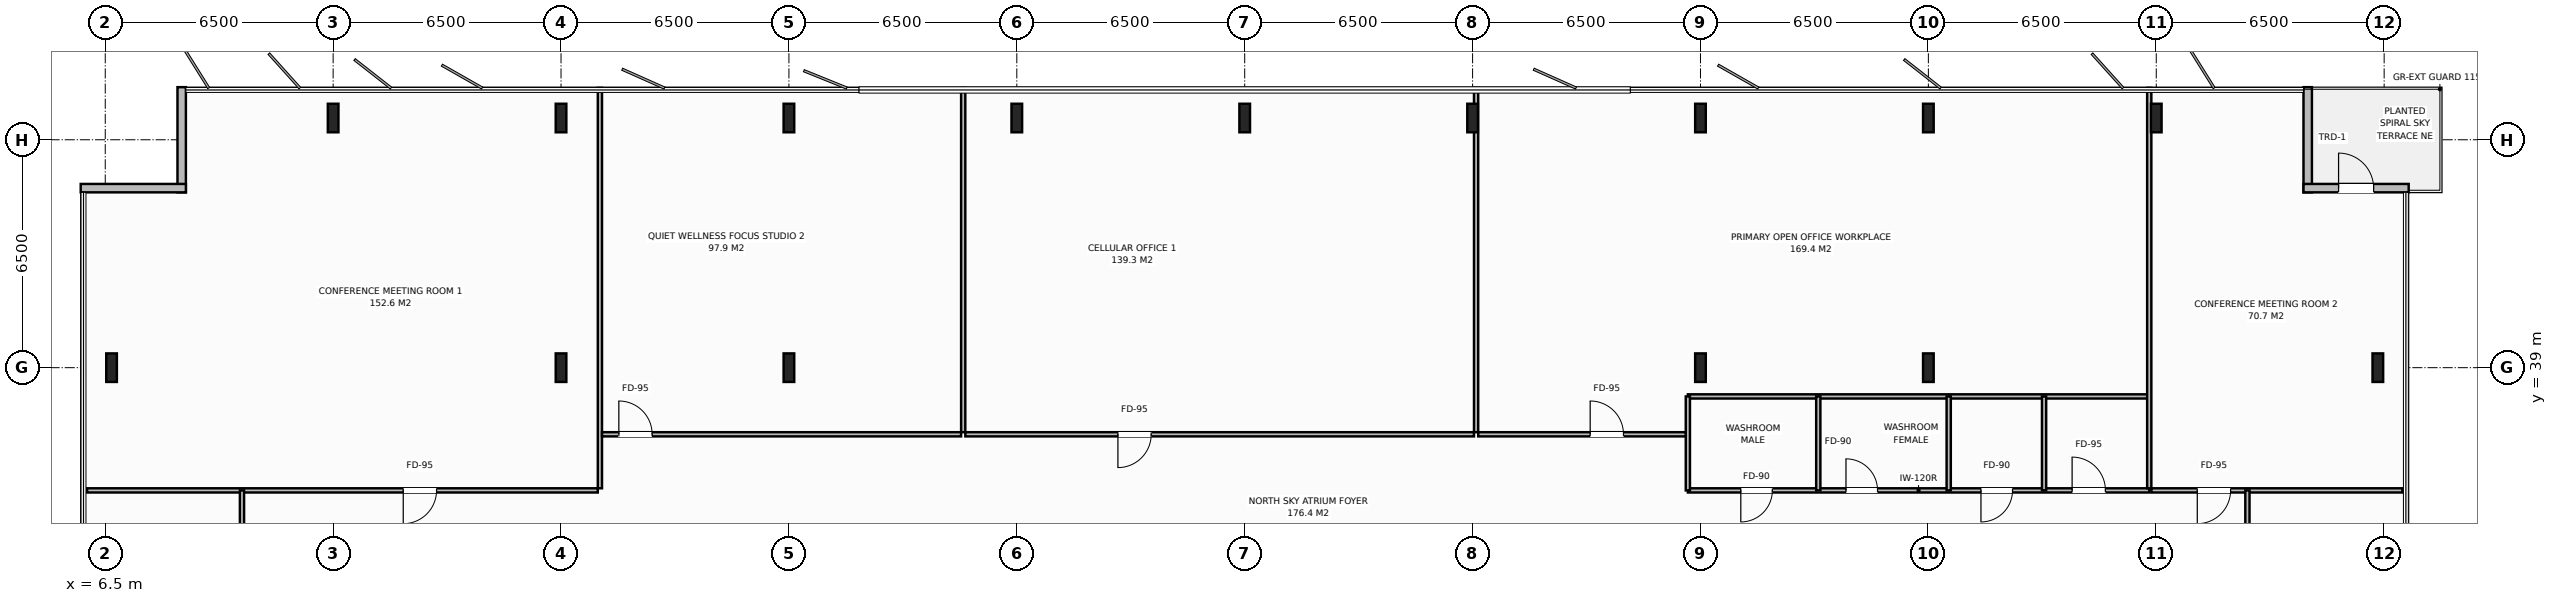
"""IFC4 building model, lengths in metres.
Left out: names, types, materials, properties, quantities, classifications, styles, units other than length and angle.
Written with IfcOpenShell. Run it as: python <this file> out.ifc"""

import sys

from ifc_helpers import new_model, si_unit, direction, frame, frame_2d, origin, origin_2d, place, context, subcontext, project, spatial, rectangle, i_section, extrude, element, fill, save


model = new_model("IFC4")
c1 = context("Model", 3, precision=1e-05, world=origin(), true_north=direction((0.0, 1.0)))
c2 = subcontext(c1, "Body", "Model", "MODEL_VIEW")
j1 = project(units=[si_unit("LENGTHUNIT", "METRE"), si_unit("PLANEANGLEUNIT", "RADIAN")], contexts=[c1])
p1 = place(None, origin())
s1 = spatial("IfcSite", under=j1, at=p1, CompositionType="ELEMENT")
p2 = place(p1, origin())
s2 = spatial("IfcBuilding", under=s1, at=p2, CompositionType="ELEMENT")
p3 = place(p2, frame((0.0, 0.0, 206.2)))
s3 = spatial("IfcBuildingStorey", under=s2, at=p3, CompositionType="ELEMENT", Elevation=206.2)
for number, where, z_axis, x_axis in (
    (1, (19.5, 39.0, 0.0), (0.0, 0.0, 1.0), (1.0, 0.0, 0.0)),
    (2, (58.5, 39.0, 0.0), (0.0, 0.0, 1.0), (1.0, 0.0, 0.0)),
    (3, (26.0, 39.0, 0.0), (0.0, 0.0, 1.0), (1.0, 0.0, 0.0)),
    (4, (52.0, 39.0, 0.0), (0.0, 0.0, 1.0), (1.0, 0.0, 0.0)),
    (5, (13.0, 46.12, 0.0), (0.0, 0.0, 1.0), (1.0, 0.0, 0.0)),
    (6, (19.5, 46.12, 0.0), (0.0, 0.0, 1.0), (1.0, 0.0, 0.0)),
    (7, (26.0, 46.12, 0.0), (0.0, 0.0, 1.0), (1.0, 0.0, 0.0)),
    (8, (32.5, 46.12, 0.0), (0.0, 0.0, 1.0), (1.0, 0.0, 0.0)),
    (9, (39.0, 46.12, 0.0), (0.0, 0.0, 1.0), (1.0, 0.0, 0.0)),
    (10, (45.5, 46.12, 0.0), (0.0, 0.0, 1.0), (1.0, 0.0, 0.0)),
    (11, (52.0, 46.12, 0.0), (0.0, 0.0, 1.0), (1.0, 0.0, 0.0)),
    (12, (58.5, 46.12, 0.0), (0.0, 0.0, 1.0), (1.0, 0.0, 0.0)),
    (13, (65.0, 46.12, 0.0), (0.0, 0.0, 1.0), (1.0, 0.0, 0.0)),
    (14, (6.68, 39.0, 0.0), (0.0, 0.0, 1.0), (1.0, 0.0, 0.0)),
    (15, (71.32, 39.0, 0.0), (0.0, 0.0, 1.0), (1.0, 0.0, 0.0)),
):
    element("IfcColumn", number, at=place(p3, frame(where, z_axis=z_axis, x_axis=x_axis)), inside=s3, PredefinedType="COLUMN", context=c2, shape_type="SweptSolid", body=[
        extrude(i_section(OverallWidth=0.303, OverallDepth=0.814, WebThickness=0.021, FlangeThickness=0.04, at=origin_2d()), origin(), (0.0, 0.0, 1.0), 3.8),
    ])
for number, where, z_axis, x_axis in (
    (16, (8.68, 44.0, 0.0), (0.0, 0.0, 1.0), (0.0, 1.0, 0.0)),
    (17, (5.8, 44.12, 0.0), (0.0, 0.0, 1.0), (1.0, 0.0, 0.0)),
    (18, (69.32, 47.0, 0.0), (0.0, 0.0, 1.0), (0.0, -1.0, 0.0)),
):
    element("IfcWall", number, at=place(p3, frame(where, z_axis=z_axis, x_axis=x_axis)), inside=s3, PredefinedType="STANDARD", context=c2, shape_type="SweptSolid", body=[
        extrude(rectangle(XDim=3.0, YDim=0.24, at=frame_2d((1.5, 0.0))), origin(), (0.0, 0.0, 1.0), 3.58),
    ])
p4 = place(p3, frame((69.2, 44.12, 0.0), z_axis=(0.0, 0.0, 1.0), x_axis=(1.0, 0.0, 0.0)))
e19 = element("IfcWall", 19, at=p4, inside=s3, PredefinedType="STANDARD", context=c2, shape_type="SweptSolid", body=[
    extrude(rectangle(XDim=3.0, YDim=0.24, at=frame_2d((1.5, 0.0))), origin(), (0.0, 0.0, 1.0), 3.58),
])
p5 = place(p4, frame((1.0, 0.0, 0.0)))
e20 = element("IfcOpeningElement", 20, at=p5, cuts=e19, PredefinedType="OPENING", context=c2, shape_type="SweptSolid", body=[
    extrude(rectangle(XDim=1.0, YDim=2.2, at=frame_2d((0.5, 1.1))), frame((0.0, 0.13, 0.0), z_axis=(0.0, -1.0, 0.0), x_axis=(1.0, 0.0, 0.0)), (0.0, 0.0, 1.0), 0.26),
])
p6 = place(p3, frame((51.64, 35.5, 0.0), z_axis=(0.0, 0.0, 1.0), x_axis=(1.0, 0.0, 0.0)))
e21 = element("IfcWall", 21, at=p6, inside=s3, PredefinedType="PARTITIONING", context=c2, shape_type="SweptSolid", body=[
    extrude(rectangle(XDim=13.16, YDim=0.12, at=frame_2d((6.58, 0.0))), origin(), (0.0, 0.0, 1.0), 3.58),
])
p7 = place(p6, frame((1.51, 0.0, 0.0)))
e22 = element("IfcOpeningElement", 22, at=p7, cuts=e21, PredefinedType="OPENING", context=c2, shape_type="SweptSolid", body=[
    extrude(rectangle(XDim=0.9, YDim=2.15, at=frame_2d((0.45, 1.075))), frame((0.0, 0.07, 0.0), z_axis=(0.0, -1.0, 0.0), x_axis=(1.0, 0.0, 0.0)), (0.0, 0.0, 1.0), 0.14),
])
p8 = place(p6, frame((4.51, 0.0, 0.0)))
e23 = element("IfcOpeningElement", 23, at=p8, cuts=e21, PredefinedType="OPENING", context=c2, shape_type="SweptSolid", body=[
    extrude(rectangle(XDim=0.9, YDim=2.15, at=frame_2d((0.45, 1.075))), frame((0.0, 0.07, 0.0), z_axis=(0.0, -1.0, 0.0), x_axis=(1.0, 0.0, 0.0)), (0.0, 0.0, 1.0), 0.14),
])
p9 = place(p6, frame((8.36, 0.0, 0.0)))
e24 = element("IfcOpeningElement", 24, at=p9, cuts=e21, PredefinedType="OPENING", context=c2, shape_type="SweptSolid", body=[
    extrude(rectangle(XDim=0.9, YDim=2.15, at=frame_2d((0.45, 1.075))), frame((0.0, 0.07, 0.0), z_axis=(0.0, -1.0, 0.0), x_axis=(1.0, 0.0, 0.0)), (0.0, 0.0, 1.0), 0.14),
])
p10 = place(p6, frame((10.96, 0.0, 0.0)))
e25 = element("IfcOpeningElement", 25, at=p10, cuts=e21, PredefinedType="OPENING", context=c2, shape_type="SweptSolid", body=[
    extrude(rectangle(XDim=0.95, YDim=2.15, at=frame_2d((0.475, 1.075))), frame((0.0, 0.07, 0.0), z_axis=(0.0, -1.0, 0.0), x_axis=(1.0, 0.0, 0.0)), (0.0, 0.0, 1.0), 0.14),
])
p11 = place(p3, frame((51.64, 38.18, 0.0), z_axis=(0.0, 0.0, 1.0), x_axis=(1.0, 0.0, 0.0)))
e26 = element("IfcWall", 26, at=p11, inside=s3, PredefinedType="PARTITIONING", context=c2, shape_type="SweptSolid", body=[
    extrude(rectangle(XDim=13.16, YDim=0.12, at=frame_2d((6.58, 0.0))), origin(), (0.0, 0.0, 1.0), 3.58),
])
for number, where, z_axis, x_axis in (
    (27, (51.64, 35.5, 0.0), (0.0, 0.0, 1.0), (0.0, 1.0, 0.0)),
    (28, (55.36, 35.5, 0.0), (0.0, 0.0, 1.0), (0.0, 1.0, 0.0)),
    (29, (59.08, 35.5, 0.0), (0.0, 0.0, 1.0), (0.0, 1.0, 0.0)),
    (30, (61.8, 35.5, 0.0), (0.0, 0.0, 1.0), (0.0, 1.0, 0.0)),
):
    element("IfcWall", number, at=place(p3, frame(where, z_axis=z_axis, x_axis=x_axis)), inside=s3, PredefinedType="PARTITIONING", context=c2, shape_type="SweptSolid", body=[
        extrude(rectangle(XDim=2.68, YDim=0.12, at=frame_2d((1.34, 0.0))), origin(), (0.0, 0.0, 1.0), 3.58),
    ])
p12 = place(p3, frame((20.609, 35.56, 0.0), z_axis=(0.0, 0.0, 1.0), x_axis=(0.0, 1.0, 0.0)))
e31 = element("IfcWall", 31, at=p12, inside=s3, PredefinedType="PARTITIONING", context=c2, shape_type="SweptSolid", body=[
    extrude(rectangle(XDim=11.42, YDim=0.12, at=frame_2d((5.71, 0.0))), origin(), (0.0, 0.0, 1.0), 3.58),
])
p13 = place(p3, frame((5.98, 35.5, 0.0), z_axis=(0.0, 0.0, 1.0), x_axis=(1.0, 0.0, 0.0)))
e32 = element("IfcWall", 32, at=p13, inside=s3, PredefinedType="PARTITIONING", context=c2, shape_type="SweptSolid", body=[
    extrude(rectangle(XDim=14.569, YDim=0.12, at=frame_2d((7.284, 0.0))), origin(), (0.0, 0.0, 1.0), 3.58),
])
p14 = place(p13, frame((9.02, 0.0, 0.0)))
e33 = element("IfcOpeningElement", 33, at=p14, cuts=e32, PredefinedType="OPENING", context=c2, shape_type="SweptSolid", body=[
    extrude(rectangle(XDim=0.95, YDim=2.15, at=frame_2d((0.475, 1.075))), frame((0.0, 0.07, 0.0), z_axis=(0.0, -1.0, 0.0), x_axis=(1.0, 0.0, 0.0)), (0.0, 0.0, 1.0), 0.14),
])
p15 = place(p3, frame((30.971, 37.16, 0.0), z_axis=(0.0, 0.0, 1.0), x_axis=(0.0, 1.0, 0.0)))
e34 = element("IfcWall", 34, at=p15, inside=s3, PredefinedType="PARTITIONING", context=c2, shape_type="SweptSolid", body=[
    extrude(rectangle(XDim=9.82, YDim=0.12, at=frame_2d((4.91, 0.0))), origin(), (0.0, 0.0, 1.0), 3.58),
])
p16 = place(p3, frame((20.669, 37.1, 0.0), z_axis=(0.0, 0.0, 1.0), x_axis=(1.0, 0.0, 0.0)))
e35 = element("IfcWall", 35, at=p16, inside=s3, PredefinedType="PARTITIONING", context=c2, shape_type="SweptSolid", body=[
    extrude(rectangle(XDim=10.242, YDim=0.12, at=frame_2d((5.121, 0.0))), origin(), (0.0, 0.0, 1.0), 3.58),
])
p17 = place(p16, frame((0.48, 0.0, 0.0)))
e36 = element("IfcOpeningElement", 36, at=p17, cuts=e35, PredefinedType="OPENING", context=c2, shape_type="SweptSolid", body=[
    extrude(rectangle(XDim=0.95, YDim=2.15, at=frame_2d((0.475, 1.075))), frame((0.0, 0.07, 0.0), z_axis=(0.0, -1.0, 0.0), x_axis=(1.0, 0.0, 0.0)), (0.0, 0.0, 1.0), 0.14),
])
p18 = place(p3, frame((45.6, 37.16, 0.0), z_axis=(0.0, 0.0, 1.0), x_axis=(0.0, 1.0, 0.0)))
e37 = element("IfcWall", 37, at=p18, inside=s3, PredefinedType="PARTITIONING", context=c2, shape_type="SweptSolid", body=[
    extrude(rectangle(XDim=9.82, YDim=0.12, at=frame_2d((4.91, 0.0))), origin(), (0.0, 0.0, 1.0), 2.88),
])
p19 = place(p3, frame((31.031, 37.1, 0.0), z_axis=(0.0, 0.0, 1.0), x_axis=(1.0, 0.0, 0.0)))
e38 = element("IfcWall", 38, at=p19, inside=s3, PredefinedType="PARTITIONING", context=c2, shape_type="SweptSolid", body=[
    extrude(rectangle(XDim=14.509, YDim=0.12, at=frame_2d((7.254, 0.0))), origin(), (0.0, 0.0, 1.0), 3.58),
])
p20 = place(p19, frame((4.353, 0.0, 0.0)))
e39 = element("IfcOpeningElement", 39, at=p20, cuts=e38, PredefinedType="OPENING", context=c2, shape_type="SweptSolid", body=[
    extrude(rectangle(XDim=0.95, YDim=2.15, at=frame_2d((0.475, 1.075))), frame((0.0, 0.07, 0.0), z_axis=(0.0, -1.0, 0.0), x_axis=(1.0, 0.0, 0.0)), (0.0, 0.0, 1.0), 0.14),
])
p21 = place(p3, frame((64.8, 35.56, 0.0), z_axis=(0.0, 0.0, 1.0), x_axis=(0.0, 1.0, 0.0)))
e40 = element("IfcWall", 40, at=p21, inside=s3, PredefinedType="PARTITIONING", context=c2, shape_type="SweptSolid", body=[
    extrude(rectangle(XDim=11.42, YDim=0.12, at=frame_2d((5.71, 0.0))), origin(), (0.0, 0.0, 1.0), 2.88),
])
p22 = place(p3, frame((45.66, 37.1, 0.0), z_axis=(0.0, 0.0, 1.0), x_axis=(1.0, 0.0, 0.0)))
e41 = element("IfcWall", 41, at=p22, inside=s3, PredefinedType="PARTITIONING", context=c2, shape_type="SweptSolid", body=[
    extrude(rectangle(XDim=5.92, YDim=0.12, at=frame_2d((2.96, 0.0))), origin(), (0.0, 0.0, 1.0), 3.58),
])
p23 = place(p22, frame((3.194, 0.0, 0.0)))
e42 = element("IfcOpeningElement", 42, at=p23, cuts=e41, PredefinedType="OPENING", context=c2, shape_type="SweptSolid", body=[
    extrude(rectangle(XDim=0.95, YDim=2.15, at=frame_2d((0.475, 1.075))), frame((0.0, 0.07, 0.0), z_axis=(0.0, -1.0, 0.0), x_axis=(1.0, 0.0, 0.0)), (0.0, 0.0, 1.0), 0.14),
])
p24 = place(p3, frame((64.86, 35.5, 0.0), z_axis=(0.0, 0.0, 1.0), x_axis=(1.0, 0.0, 0.0)))
e43 = element("IfcWall", 43, at=p24, inside=s3, PredefinedType="PARTITIONING", context=c2, shape_type="SweptSolid", body=[
    extrude(rectangle(XDim=7.16, YDim=0.12, at=frame_2d((3.58, 0.0))), origin(), (0.0, 0.0, 1.0), 3.58),
])
p25 = place(p24, frame((1.31, 0.0, 0.0)))
e44 = element("IfcOpeningElement", 44, at=p25, cuts=e43, PredefinedType="OPENING", context=c2, shape_type="SweptSolid", body=[
    extrude(rectangle(XDim=0.95, YDim=2.15, at=frame_2d((0.475, 1.075))), frame((0.0, 0.07, 0.0), z_axis=(0.0, -1.0, 0.0), x_axis=(1.0, 0.0, 0.0)), (0.0, 0.0, 1.0), 0.14),
])
p26 = place(p3, frame((10.4, 16.5, 0.0), z_axis=(0.0, 0.0, 1.0), x_axis=(0.0, 1.0, 0.0)))
e45 = element("IfcWall", 45, at=p26, inside=s3, PredefinedType="PARTITIONING", context=c2, shape_type="SweptSolid", body=[
    extrude(rectangle(XDim=19.0, YDim=0.12, at=frame_2d((9.5, 0.0))), origin(), (0.0, 0.0, 1.0), 3.58),
])
p27 = place(p26, frame((9.025, 0.0, 0.0)))
e46 = element("IfcOpeningElement", 46, at=p27, cuts=e45, PredefinedType="OPENING", context=c2, shape_type="SweptSolid", body=[
    extrude(rectangle(XDim=0.95, YDim=2.15, at=frame_2d((0.475, 1.075))), frame((0.0, 0.07, 0.0), z_axis=(0.0, -1.0, 0.0), x_axis=(1.0, 0.0, 0.0)), (0.0, 0.0, 1.0), 0.14),
])
p28 = place(p3, frame((67.6, 26.0, 0.0), z_axis=(0.0, 0.0, 1.0), x_axis=(0.0, 1.0, 0.0)))
e47 = element("IfcWall", 47, at=p28, inside=s3, PredefinedType="PARTITIONING", context=c2, shape_type="SweptSolid", body=[
    extrude(rectangle(XDim=9.5, YDim=0.12, at=frame_2d((4.75, 0.0))), origin(), (0.0, 0.0, 1.0), 3.58),
])
p29 = place(p28, frame((3.225, 0.0, 0.0)))
e48 = element("IfcOpeningElement", 48, at=p29, cuts=e47, PredefinedType="OPENING", context=c2, shape_type="SweptSolid", body=[
    extrude(rectangle(XDim=0.95, YDim=2.15, at=frame_2d((0.475, 1.075))), frame((0.0, 0.07, 0.0), z_axis=(0.0, -1.0, 0.0), x_axis=(1.0, 0.0, 0.0)), (0.0, 0.0, 1.0), 0.14),
])
p30 = place(p5, origin())
e49 = element("IfcDoor", 49, at=p30, inside=s3, OperationType="SINGLE_SWING_LEFT", PredefinedType="DOOR", context=c2, shape_type="SweptSolid", body=[
    extrude(rectangle(XDim=1.0, YDim=2.2, at=frame_2d((0.5, 1.1))), frame((0.0, 0.025, 0.0), z_axis=(0.0, -1.0, 0.0), x_axis=(1.0, 0.0, 0.0)), (0.0, 0.0, 1.0), 0.05),
])
fill(e20, e49)
p31 = place(p7, origin())
e50 = element("IfcDoor", 50, at=p31, inside=s3, OperationType="SINGLE_SWING_RIGHT", PredefinedType="DOOR", context=c2, shape_type="SweptSolid", body=[
    extrude(rectangle(XDim=0.9, YDim=2.15, at=frame_2d((0.45, 1.075))), frame((0.0, 0.025, 0.0), z_axis=(0.0, -1.0, 0.0), x_axis=(1.0, 0.0, 0.0)), (0.0, 0.0, 1.0), 0.05),
])
fill(e22, e50)
p32 = place(p8, origin())
e51 = element("IfcDoor", 51, at=p32, inside=s3, OperationType="SINGLE_SWING_LEFT", PredefinedType="DOOR", context=c2, shape_type="SweptSolid", body=[
    extrude(rectangle(XDim=0.9, YDim=2.15, at=frame_2d((0.45, 1.075))), frame((0.0, 0.025, 0.0), z_axis=(0.0, -1.0, 0.0), x_axis=(1.0, 0.0, 0.0)), (0.0, 0.0, 1.0), 0.05),
])
fill(e23, e51)
p33 = place(p9, origin())
e52 = element("IfcDoor", 52, at=p33, inside=s3, OperationType="SINGLE_SWING_RIGHT", PredefinedType="DOOR", context=c2, shape_type="SweptSolid", body=[
    extrude(rectangle(XDim=0.9, YDim=2.15, at=frame_2d((0.45, 1.075))), frame((0.0, 0.025, 0.0), z_axis=(0.0, -1.0, 0.0), x_axis=(1.0, 0.0, 0.0)), (0.0, 0.0, 1.0), 0.05),
])
fill(e24, e52)
p34 = place(p10, origin())
e53 = element("IfcDoor", 53, at=p34, inside=s3, OperationType="SINGLE_SWING_LEFT", PredefinedType="DOOR", context=c2, shape_type="SweptSolid", body=[
    extrude(rectangle(XDim=0.95, YDim=2.15, at=frame_2d((0.475, 1.075))), frame((0.0, 0.025, 0.0), z_axis=(0.0, -1.0, 0.0), x_axis=(1.0, 0.0, 0.0)), (0.0, 0.0, 1.0), 0.05),
])
fill(e25, e53)
p35 = place(p14, origin())
e54 = element("IfcDoor", 54, at=p35, inside=s3, OperationType="SINGLE_SWING_RIGHT", PredefinedType="DOOR", context=c2, shape_type="SweptSolid", body=[
    extrude(rectangle(XDim=0.95, YDim=2.15, at=frame_2d((0.475, 1.075))), frame((0.0, 0.025, 0.0), z_axis=(0.0, -1.0, 0.0), x_axis=(1.0, 0.0, 0.0)), (0.0, 0.0, 1.0), 0.05),
])
fill(e33, e54)
p36 = place(p17, origin())
e55 = element("IfcDoor", 55, at=p36, inside=s3, OperationType="SINGLE_SWING_LEFT", PredefinedType="DOOR", context=c2, shape_type="SweptSolid", body=[
    extrude(rectangle(XDim=0.95, YDim=2.15, at=frame_2d((0.475, 1.075))), frame((0.0, 0.025, 0.0), z_axis=(0.0, -1.0, 0.0), x_axis=(1.0, 0.0, 0.0)), (0.0, 0.0, 1.0), 0.05),
])
fill(e36, e55)
p37 = place(p20, origin())
e56 = element("IfcDoor", 56, at=p37, inside=s3, OperationType="SINGLE_SWING_RIGHT", PredefinedType="DOOR", context=c2, shape_type="SweptSolid", body=[
    extrude(rectangle(XDim=0.95, YDim=2.15, at=frame_2d((0.475, 1.075))), frame((0.0, 0.025, 0.0), z_axis=(0.0, -1.0, 0.0), x_axis=(1.0, 0.0, 0.0)), (0.0, 0.0, 1.0), 0.05),
])
fill(e39, e56)
p38 = place(p23, origin())
e57 = element("IfcDoor", 57, at=p38, inside=s3, OperationType="SINGLE_SWING_LEFT", PredefinedType="DOOR", context=c2, shape_type="SweptSolid", body=[
    extrude(rectangle(XDim=0.95, YDim=2.15, at=frame_2d((0.475, 1.075))), frame((0.0, 0.025, 0.0), z_axis=(0.0, -1.0, 0.0), x_axis=(1.0, 0.0, 0.0)), (0.0, 0.0, 1.0), 0.05),
])
fill(e42, e57)
p39 = place(p25, origin())
e58 = element("IfcDoor", 58, at=p39, inside=s3, OperationType="SINGLE_SWING_RIGHT", PredefinedType="DOOR", context=c2, shape_type="SweptSolid", body=[
    extrude(rectangle(XDim=0.95, YDim=2.15, at=frame_2d((0.475, 1.075))), frame((0.0, 0.025, 0.0), z_axis=(0.0, -1.0, 0.0), x_axis=(1.0, 0.0, 0.0)), (0.0, 0.0, 1.0), 0.05),
])
fill(e44, e58)
save(model, sys.argv[1])
